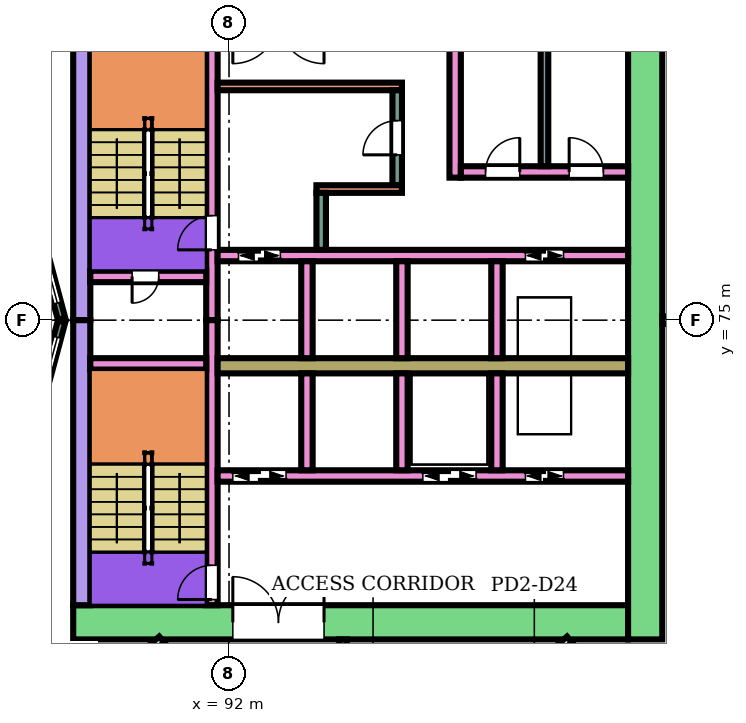
"""IFC4 building model, lengths in metres.
Left out: names, types, materials, properties, quantities, classifications, styles, units other than length and angle.
Written with IfcOpenShell. Run it as: python <this file> out.ifc"""

import sys

from ifc_helpers import new_model, si_unit, direction, frame, frame_2d, origin, place, context, subcontext, project, spatial, rectangle, extrude, element, fill, save


model = new_model("IFC4")
c1 = context("Model", 3, precision=1e-05, world=origin(), true_north=direction((0.0, 1.0)))
c2 = subcontext(c1, "Body", "Model", "MODEL_VIEW")
j1 = project(units=[si_unit("LENGTHUNIT", "METRE"), si_unit("PLANEANGLEUNIT", "RADIAN")], contexts=[c1])
p1 = place(None, origin())
s1 = spatial("IfcSite", under=j1, at=p1, CompositionType="ELEMENT")
p2 = place(p1, origin())
s2 = spatial("IfcBuilding", under=s1, at=p2, CompositionType="ELEMENT")
p3 = place(p2, frame((0.0, 0.0, 12.4)))
s3 = spatial("IfcBuildingStorey", under=s2, at=p3, CompositionType="ELEMENT", Elevation=12.4)
p4 = place(p3, frame((87.9, 67.05, 0.0), z_axis=(0.0, 0.0, 1.0), x_axis=(1.0, 0.0, 0.0)))
e1 = element("IfcWall", 1, at=p4, inside=s3, PredefinedType="SHEAR", context=c2, shape_type="SweptSolid", body=[
    extrude(rectangle(XDim=14.6, YDim=0.9, at=frame_2d((7.3, 0.0))), origin(), (0.0, 0.0, 1.0), 4.95),
])
p5 = place(p4, frame((4.2, 0.0, 0.0)))
e2 = element("IfcOpeningElement", 2, at=p5, cuts=e1, PredefinedType="OPENING", context=c2, shape_type="SweptSolid", body=[
    extrude(rectangle(XDim=2.4, YDim=2.4, at=frame_2d((1.2, 1.2))), frame((0.0, 0.46, 0.0), z_axis=(0.0, -1.0, 0.0), x_axis=(1.0, 0.0, 0.0)), (0.0, 0.0, 1.0), 0.92),
])
for number, where, z_axis, x_axis in (
    (3, (88.125, 75.0, 0.0), (0.0, 0.0, 1.0), (0.0, 1.0, 0.0)),
    (4, (88.125, 67.5, 0.0), (0.0, 0.0, 1.0), (0.0, 1.0, 0.0)),
):
    element("IfcWall", number, at=place(p3, frame(where, z_axis=z_axis, x_axis=x_axis)), inside=s3, PredefinedType="SHEAR", context=c2, shape_type="SweptSolid", body=[
        extrude(rectangle(XDim=7.5, YDim=0.45, at=frame_2d((3.75, 0.0))), origin(), (0.0, 0.0, 1.0), 4.95),
    ])
p6 = place(p3, frame((102.95, 66.6, 0.0), z_axis=(0.0, 0.0, 1.0), x_axis=(0.0, 1.0, 0.0)))
e5 = element("IfcWall", 5, at=p6, inside=s3, PredefinedType="SHEAR", context=c2, shape_type="SweptSolid", body=[
    extrude(rectangle(XDim=16.8, YDim=0.9, at=frame_2d((8.4, 0.0))), origin(), (0.0, 0.0, 1.0), 4.95),
])
p7 = place(p3, frame((91.55, 75.0, 0.0), z_axis=(0.0, 0.0, 1.0), x_axis=(0.0, 1.0, 0.0)))
e6 = element("IfcWall", 6, at=p7, inside=s3, PredefinedType="SHEAR", context=c2, shape_type="SweptSolid", body=[
    extrude(rectangle(XDim=7.5, YDim=0.3, at=frame_2d((3.75, 0.0))), origin(), (0.0, 0.0, 1.0), 4.95),
])
p8 = place(p7, frame((1.85, 0.0, 0.0)))
e7 = element("IfcOpeningElement", 7, at=p8, cuts=e6, PredefinedType="OPENING", context=c2, shape_type="SweptSolid", body=[
    extrude(rectangle(XDim=0.9, YDim=2.1, at=frame_2d((0.45, 1.05))), frame((0.0, 0.16, 0.0), z_axis=(0.0, -1.0, 0.0), x_axis=(1.0, 0.0, 0.0)), (0.0, 0.0, 1.0), 0.32),
])
p9 = place(p3, frame((91.55, 67.5, 0.0), z_axis=(0.0, 0.0, 1.0), x_axis=(0.0, 1.0, 0.0)))
e8 = element("IfcWall", 8, at=p9, inside=s3, PredefinedType="SHEAR", context=c2, shape_type="SweptSolid", body=[
    extrude(rectangle(XDim=7.5, YDim=0.3, at=frame_2d((3.75, 0.0))), origin(), (0.0, 0.0, 1.0), 4.95),
])
p10 = place(p9, frame((0.15, 0.0, 0.0)))
e9 = element("IfcOpeningElement", 9, at=p10, cuts=e8, PredefinedType="OPENING", context=c2, shape_type="SweptSolid", body=[
    extrude(rectangle(XDim=0.9, YDim=2.1, at=frame_2d((0.45, 1.05))), frame((0.0, 0.16, 0.0), z_axis=(0.0, -1.0, 0.0), x_axis=(1.0, 0.0, 0.0)), (0.0, 0.0, 1.0), 0.32),
])
p11 = place(p3, frame((88.35, 76.15, 0.0), z_axis=(0.0, 0.0, 1.0), x_axis=(1.0, 0.0, 0.0)))
e10 = element("IfcWall", 10, at=p11, inside=s3, PredefinedType="SHEAR", context=c2, shape_type="SweptSolid", body=[
    extrude(rectangle(XDim=3.05, YDim=0.3, at=frame_2d((1.525, 0.0))), origin(), (0.0, 0.0, 1.0), 4.95),
])
p12 = place(p11, frame((1.1, 0.0, 0.0)))
e11 = element("IfcOpeningElement", 11, at=p12, cuts=e10, PredefinedType="OPENING", context=c2, shape_type="SweptSolid", body=[
    extrude(rectangle(XDim=0.7, YDim=2.0, at=frame_2d((0.35, 1.0))), frame((0.0, 0.16, 0.0), z_axis=(0.0, -1.0, 0.0), x_axis=(1.0, 0.0, 0.0)), (0.0, 0.0, 1.0), 0.32),
])
p13 = place(p3, frame((88.35, 73.85, 0.0), z_axis=(0.0, 0.0, 1.0), x_axis=(1.0, 0.0, 0.0)))
e12 = element("IfcWall", 12, at=p13, inside=s3, PredefinedType="SHEAR", context=c2, shape_type="SweptSolid", body=[
    extrude(rectangle(XDim=3.05, YDim=0.3, at=frame_2d((1.525, 0.0))), origin(), (0.0, 0.0, 1.0), 4.95),
])
p14 = place(p3, frame((91.7, 76.7, 0.0), z_axis=(0.0, 0.0, 1.0), x_axis=(1.0, 0.0, 0.0)))
e13 = element("IfcWall", 13, at=p14, inside=s3, PredefinedType="SHEAR", context=c2, shape_type="SweptSolid", body=[
    extrude(rectangle(XDim=10.8, YDim=0.3, at=frame_2d((5.4, 0.0))), origin(), (0.0, 0.0, 1.0), 4.95),
])
p15 = place(p14, frame((0.55, 0.0, 0.0)))
e14 = element("IfcOpeningElement", 14, at=p15, cuts=e13, PredefinedType="OPENING", context=c2, shape_type="SweptSolid", body=[
    extrude(rectangle(XDim=1.1, YDim=2.1, at=frame_2d((0.55, 1.05))), frame((0.0, 0.16, 0.0), z_axis=(0.0, -1.0, 0.0), x_axis=(1.0, 0.0, 0.0)), (0.0, 0.0, 1.0), 0.32),
])
p16 = place(p14, frame((8.1, 0.0, 0.0)))
e15 = element("IfcOpeningElement", 15, at=p16, cuts=e13, PredefinedType="OPENING", context=c2, shape_type="SweptSolid", body=[
    extrude(rectangle(XDim=1.0, YDim=2.1, at=frame_2d((0.5, 1.05))), frame((0.0, 0.16, 0.0), z_axis=(0.0, -1.0, 0.0), x_axis=(1.0, 0.0, 0.0)), (0.0, 0.0, 1.0), 0.32),
])
p17 = place(p3, frame((91.7, 73.8, 0.0), z_axis=(0.0, 0.0, 1.0), x_axis=(1.0, 0.0, 0.0)))
e16 = element("IfcWall", 16, at=p17, inside=s3, PredefinedType="SHEAR", context=c2, shape_type="SweptSolid", body=[
    extrude(rectangle(XDim=10.8, YDim=0.4, at=frame_2d((5.4, 0.0))), origin(), (0.0, 0.0, 1.0), 4.95),
])
p18 = place(p3, frame((91.7, 70.9, 0.0), z_axis=(0.0, 0.0, 1.0), x_axis=(1.0, 0.0, 0.0)))
e17 = element("IfcWall", 17, at=p18, inside=s3, PredefinedType="SHEAR", context=c2, shape_type="SweptSolid", body=[
    extrude(rectangle(XDim=10.8, YDim=0.3, at=frame_2d((5.4, 0.0))), origin(), (0.0, 0.0, 1.0), 4.95),
])
p19 = place(p18, frame((0.4, 0.0, 0.0)))
e18 = element("IfcOpeningElement", 18, at=p19, cuts=e17, PredefinedType="OPENING", context=c2, shape_type="SweptSolid", body=[
    extrude(rectangle(XDim=1.4, YDim=2.1, at=frame_2d((0.7, 1.05))), frame((0.0, 0.16, 0.0), z_axis=(0.0, -1.0, 0.0), x_axis=(1.0, 0.0, 0.0)), (0.0, 0.0, 1.0), 0.32),
])
p20 = place(p18, frame((5.4, 0.0, 0.0)))
e19 = element("IfcOpeningElement", 19, at=p20, cuts=e17, PredefinedType="OPENING", context=c2, shape_type="SweptSolid", body=[
    extrude(rectangle(XDim=1.4, YDim=2.1, at=frame_2d((0.7, 1.05))), frame((0.0, 0.16, 0.0), z_axis=(0.0, -1.0, 0.0), x_axis=(1.0, 0.0, 0.0)), (0.0, 0.0, 1.0), 0.32),
])
p21 = place(p18, frame((8.1, 0.0, 0.0)))
e20 = element("IfcOpeningElement", 20, at=p21, cuts=e17, PredefinedType="OPENING", context=c2, shape_type="SweptSolid", body=[
    extrude(rectangle(XDim=1.0, YDim=2.1, at=frame_2d((0.5, 1.05))), frame((0.0, 0.16, 0.0), z_axis=(0.0, -1.0, 0.0), x_axis=(1.0, 0.0, 0.0)), (0.0, 0.0, 1.0), 0.32),
])
for number, where, z_axis, x_axis in (
    (21, (94.05, 74.0, 0.0), (0.0, 0.0, 1.0), (0.0, 1.0, 0.0)),
    (22, (96.55, 74.0, 0.0), (0.0, 0.0, 1.0), (0.0, 1.0, 0.0)),
    (23, (99.05, 74.0, 0.0), (0.0, 0.0, 1.0), (0.0, 1.0, 0.0)),
    (24, (94.05, 71.05, 0.0), (0.0, 0.0, 1.0), (0.0, 1.0, 0.0)),
    (25, (96.55, 71.05, 0.0), (0.0, 0.0, 1.0), (0.0, 1.0, 0.0)),
    (26, (99.05, 71.05, 0.0), (0.0, 0.0, 1.0), (0.0, 1.0, 0.0)),
):
    element("IfcWall", number, at=place(p3, frame(where, z_axis=z_axis, x_axis=x_axis)), inside=s3, PredefinedType="SHEAR", context=c2, shape_type="SweptSolid", body=[
        extrude(rectangle(XDim=2.55, YDim=0.3, at=frame_2d((1.275, 0.0))), origin(), (0.0, 0.0, 1.0), 4.95),
    ])
p22 = place(p3, frame((91.7, 81.15, 0.0), z_axis=(0.0, 0.0, 1.0), x_axis=(1.0, 0.0, 0.0)))
e27 = element("IfcWall", 27, at=p22, inside=s3, PredefinedType="SHEAR", context=c2, shape_type="SweptSolid", body=[
    extrude(rectangle(XDim=4.85, YDim=0.2, at=frame_2d((2.425, 0.0))), origin(), (0.0, 0.0, 1.0), 4.95),
])
p23 = place(p3, frame((96.425, 78.55, 0.0), z_axis=(0.0, 0.0, 1.0), x_axis=(0.0, 1.0, 0.0)))
e28 = element("IfcWall", 28, at=p23, inside=s3, PredefinedType="SHEAR", context=c2, shape_type="SweptSolid", body=[
    extrude(rectangle(XDim=2.5, YDim=0.25, at=frame_2d((1.25, 0.0))), origin(), (0.0, 0.0, 1.0), 4.95),
])
p24 = place(p23, frame((0.8, 0.0, 0.0)))
e29 = element("IfcOpeningElement", 29, at=p24, cuts=e28, PredefinedType="OPENING", context=c2, shape_type="SweptSolid", body=[
    extrude(rectangle(XDim=0.9, YDim=2.1, at=frame_2d((0.45, 1.05))), frame((0.0, 0.135, 0.0), z_axis=(0.0, -1.0, 0.0), x_axis=(1.0, 0.0, 0.0)), (0.0, 0.0, 1.0), 0.27),
])
p25 = place(p3, frame((94.3, 78.45, 0.0), z_axis=(0.0, 0.0, 1.0), x_axis=(1.0, 0.0, 0.0)))
e30 = element("IfcWall", 30, at=p25, inside=s3, PredefinedType="SHEAR", context=c2, shape_type="SweptSolid", body=[
    extrude(rectangle(XDim=2.25, YDim=0.2, at=frame_2d((1.125, 0.0))), origin(), (0.0, 0.0, 1.0), 4.95),
])
p26 = place(p3, frame((94.425, 76.85, 0.0), z_axis=(0.0, 0.0, 1.0), x_axis=(0.0, 1.0, 0.0)))
e31 = element("IfcWall", 31, at=p26, inside=s3, PredefinedType="SHEAR", context=c2, shape_type="SweptSolid", body=[
    extrude(rectangle(XDim=1.5, YDim=0.25, at=frame_2d((0.75, 0.0))), origin(), (0.0, 0.0, 1.0), 4.95),
])
p27 = place(p3, frame((97.95, 78.75, 0.0), z_axis=(0.0, 0.0, 1.0), x_axis=(0.0, 1.0, 0.0)))
e32 = element("IfcWall", 32, at=p27, inside=s3, PredefinedType="SHEAR", context=c2, shape_type="SweptSolid", body=[
    extrude(rectangle(XDim=3.75, YDim=0.3, at=frame_2d((1.875, 0.0))), origin(), (0.0, 0.0, 1.0), 4.95),
])
p28 = place(p3, frame((98.1, 78.9, 0.0), z_axis=(0.0, 0.0, 1.0), x_axis=(1.0, 0.0, 0.0)))
e33 = element("IfcWall", 33, at=p28, inside=s3, PredefinedType="SHEAR", context=c2, shape_type="SweptSolid", body=[
    extrude(rectangle(XDim=4.4, YDim=0.3, at=frame_2d((2.2, 0.0))), origin(), (0.0, 0.0, 1.0), 4.95),
])
p29 = place(p28, frame((0.65, 0.0, 0.0)))
e34 = element("IfcOpeningElement", 34, at=p29, cuts=e33, PredefinedType="OPENING", context=c2, shape_type="SweptSolid", body=[
    extrude(rectangle(XDim=0.9, YDim=2.1, at=frame_2d((0.45, 1.05))), frame((0.0, 0.16, 0.0), z_axis=(0.0, -1.0, 0.0), x_axis=(1.0, 0.0, 0.0)), (0.0, 0.0, 1.0), 0.32),
])
p30 = place(p28, frame((2.85, 0.0, 0.0)))
e35 = element("IfcOpeningElement", 35, at=p30, cuts=e33, PredefinedType="OPENING", context=c2, shape_type="SweptSolid", body=[
    extrude(rectangle(XDim=0.9, YDim=2.1, at=frame_2d((0.45, 1.05))), frame((0.0, 0.16, 0.0), z_axis=(0.0, -1.0, 0.0), x_axis=(1.0, 0.0, 0.0)), (0.0, 0.0, 1.0), 0.32),
])
p31 = place(p3, frame((87.604, 75.0, 0.0), z_axis=(0.0, 0.0, 1.0), x_axis=(-0.258789828301, 0.965933654434, 0.0)))
e36 = element("IfcWall", 36, at=p31, inside=s3, PredefinedType="NOTDEFINED", context=c2, shape_type="SweptSolid", body=[
    extrude(rectangle(XDim=3.936, YDim=0.2, at=frame_2d((1.968, 0.0))), origin(), (0.0, 0.0, 1.0), 5.4),
])
p32 = place(p31, frame((0.468, 0.0, 0.9)))
e37 = element("IfcOpeningElement", 37, at=p32, cuts=e36, PredefinedType="OPENING", context=c2, shape_type="SweptSolid", body=[
    extrude(rectangle(XDim=3.0, YDim=2.3, at=frame_2d((1.5, 1.15))), frame((0.0, 0.11, 0.0), z_axis=(0.0, -1.0, 0.0), x_axis=(1.0, 0.0, 0.0)), (0.0, 0.0, 1.0), 0.22),
])
p33 = place(p3, frame((86.585, 71.198, 0.0), z_axis=(0.0, 0.0, 1.0), x_axis=(0.258789828301, 0.965933654434, 0.0)))
e38 = element("IfcWall", 38, at=p33, inside=s3, PredefinedType="NOTDEFINED", context=c2, shape_type="SweptSolid", body=[
    extrude(rectangle(XDim=3.936, YDim=0.2, at=frame_2d((1.968, 0.0))), origin(), (0.0, 0.0, 1.0), 5.4),
])
p34 = place(p33, frame((0.468, 0.0, 0.9)))
e39 = element("IfcOpeningElement", 39, at=p34, cuts=e38, PredefinedType="OPENING", context=c2, shape_type="SweptSolid", body=[
    extrude(rectangle(XDim=3.0, YDim=2.3, at=frame_2d((1.5, 1.15))), frame((0.0, 0.11, 0.0), z_axis=(0.0, -1.0, 0.0), x_axis=(1.0, 0.0, 0.0)), (0.0, 0.0, 1.0), 0.22),
])
p35 = place(p3, frame((86.685, 63.551, 0.0), z_axis=(0.0, 0.0, 1.0), x_axis=(0.758049900748, 0.652196556244, 0.0)))
e40 = element("IfcWall", 40, at=p35, inside=s3, PredefinedType="PARTITIONING", context=c2, shape_type="SweptSolid", body=[
    extrude(rectangle(XDim=4.675, YDim=0.2, at=frame_2d((2.337, 0.0))), origin(), (0.0, 0.0, 1.0), 4.95),
])
p36 = place(p35, frame((1.887, 0.0, 0.0)))
e41 = element("IfcOpeningElement", 41, at=p36, cuts=e40, PredefinedType="OPENING", context=c2, shape_type="SweptSolid", body=[
    extrude(rectangle(XDim=0.9, YDim=2.1, at=frame_2d((0.45, 1.05))), frame((0.0, 0.11, 0.0), z_axis=(0.0, -1.0, 0.0), x_axis=(1.0, 0.0, 0.0)), (0.0, 0.0, 1.0), 0.22),
])
p37 = place(p3, frame((94.293, 60.863, 0.0), z_axis=(0.0, 0.0, 1.0), x_axis=(0.757971612666, 0.652287539658, 0.0)))
e42 = element("IfcWall", 42, at=p37, inside=s3, PredefinedType="PARTITIONING", context=c2, shape_type="SweptSolid", body=[
    extrude(rectangle(XDim=8.794, YDim=0.2, at=frame_2d((4.397, 0.0))), origin(), (0.0, 0.0, 1.0), 4.95),
])
p38 = place(p37, frame((0.267, 0.0, 0.0)))
e43 = element("IfcOpeningElement", 43, at=p38, cuts=e42, PredefinedType="OPENING", context=c2, shape_type="SweptSolid", body=[
    extrude(rectangle(XDim=0.9, YDim=2.1, at=frame_2d((0.45, 1.05))), frame((0.0, 0.11, 0.0), z_axis=(0.0, -1.0, 0.0), x_axis=(1.0, 0.0, 0.0)), (0.0, 0.0, 1.0), 0.22),
])
p39 = place(p37, frame((2.446, 0.0, 0.0)))
e44 = element("IfcOpeningElement", 44, at=p39, cuts=e42, PredefinedType="OPENING", context=c2, shape_type="SweptSolid", body=[
    extrude(rectangle(XDim=0.9, YDim=2.1, at=frame_2d((0.45, 1.05))), frame((0.0, 0.11, 0.0), z_axis=(0.0, -1.0, 0.0), x_axis=(1.0, 0.0, 0.0)), (0.0, 0.0, 1.0), 0.22),
])
p40 = place(p37, frame((4.87, 0.0, 0.0)))
e45 = element("IfcOpeningElement", 45, at=p40, cuts=e42, PredefinedType="OPENING", context=c2, shape_type="SweptSolid", body=[
    extrude(rectangle(XDim=0.9, YDim=2.1, at=frame_2d((0.45, 1.05))), frame((0.0, 0.11, 0.0), z_axis=(0.0, -1.0, 0.0), x_axis=(1.0, 0.0, 0.0)), (0.0, 0.0, 1.0), 0.22),
])
p41 = place(p37, frame((7.123, 0.0, 0.0)))
e46 = element("IfcOpeningElement", 46, at=p41, cuts=e42, PredefinedType="OPENING", context=c2, shape_type="SweptSolid", body=[
    extrude(rectangle(XDim=0.9, YDim=2.1, at=frame_2d((0.45, 1.05))), frame((0.0, 0.11, 0.0), z_axis=(0.0, -1.0, 0.0), x_axis=(1.0, 0.0, 0.0)), (0.0, 0.0, 1.0), 0.22),
])
p42 = place(p3, frame((95.0, 65.1, 0.0), z_axis=(0.0, 0.0, 1.0), x_axis=(0.0, 1.0, 0.0)))
e47 = element("IfcWall", 47, at=p42, inside=s3, PredefinedType="PARTITIONING", context=c2, shape_type="SweptSolid", body=[
    extrude(rectangle(XDim=1.499, YDim=0.2, at=frame_2d((0.75, 0.0))), origin(), (0.0, 0.0, 1.0), 4.95),
])
p43 = place(p3, frame((103.402, 75.0, 0.0), z_axis=(0.0, 0.0, 1.0), x_axis=(1.0, 0.0, 0.0)))
e48 = element("IfcWall", 48, at=p43, inside=s3, PredefinedType="PARTITIONING", context=c2, shape_type="SweptSolid", body=[
    extrude(rectangle(XDim=12.394, YDim=0.2, at=frame_2d((6.197, 0.0))), origin(), (0.0, 0.0, 1.0), 3.75),
])
p44 = place(p3, frame((100.3, 79.05, 0.0), z_axis=(0.0, 0.0, 1.0), x_axis=(0.0, 1.0, 0.0)))
e49 = element("IfcWall", 49, at=p44, inside=s3, PredefinedType="PARTITIONING", context=c2, shape_type="SweptSolid", body=[
    extrude(rectangle(XDim=3.45, YDim=0.2, at=frame_2d((1.725, 0.0))), origin(), (0.0, 0.0, 1.0), 4.95),
])
p45 = place(p32, origin())
e50 = element("IfcWindow", 50, at=p45, inside=s3, PartitioningType="SINGLE_PANEL", PredefinedType="WINDOW", context=c2, shape_type="SweptSolid", body=[
    extrude(rectangle(XDim=3.0, YDim=2.3, at=frame_2d((1.5, 1.15))), frame((0.0, 0.03, 0.0), z_axis=(0.0, -1.0, 0.0), x_axis=(1.0, 0.0, 0.0)), (0.0, 0.0, 1.0), 0.06),
])
fill(e37, e50)
p46 = place(p34, origin())
e51 = element("IfcWindow", 51, at=p46, inside=s3, PartitioningType="SINGLE_PANEL", PredefinedType="WINDOW", context=c2, shape_type="SweptSolid", body=[
    extrude(rectangle(XDim=3.0, YDim=2.3, at=frame_2d((1.5, 1.15))), frame((0.0, 0.03, 0.0), z_axis=(0.0, -1.0, 0.0), x_axis=(1.0, 0.0, 0.0)), (0.0, 0.0, 1.0), 0.06),
])
fill(e39, e51)
p47 = place(p12, frame((0.7, 0.0, 0.0), z_axis=(0.0, 0.0, 1.0), x_axis=(-1.0, 0.0, 0.0)))
e52 = element("IfcDoor", 52, at=p47, inside=s3, OperationType="SINGLE_SWING_RIGHT", PredefinedType="DOOR", context=c2, shape_type="SweptSolid", body=[
    extrude(rectangle(XDim=0.7, YDim=2.0, at=frame_2d((0.35, 1.0))), frame((0.0, 0.025, 0.0), z_axis=(0.0, -1.0, 0.0), x_axis=(1.0, 0.0, 0.0)), (0.0, 0.0, 1.0), 0.05),
])
fill(e11, e52)
p48 = place(p8, origin())
e53 = element("IfcDoor", 53, at=p48, inside=s3, OperationType="SINGLE_SWING_LEFT", PredefinedType="DOOR", context=c2, shape_type="SweptSolid", body=[
    extrude(rectangle(XDim=0.9, YDim=2.1, at=frame_2d((0.45, 1.05))), frame((0.0, 0.025, 0.0), z_axis=(0.0, -1.0, 0.0), x_axis=(1.0, 0.0, 0.0)), (0.0, 0.0, 1.0), 0.05),
])
fill(e7, e53)
p49 = place(p10, origin())
e54 = element("IfcDoor", 54, at=p49, inside=s3, OperationType="SINGLE_SWING_LEFT", PredefinedType="DOOR", context=c2, shape_type="SweptSolid", body=[
    extrude(rectangle(XDim=0.9, YDim=2.1, at=frame_2d((0.45, 1.05))), frame((0.0, 0.025, 0.0), z_axis=(0.0, -1.0, 0.0), x_axis=(1.0, 0.0, 0.0)), (0.0, 0.0, 1.0), 0.05),
])
fill(e9, e54)
p50 = place(p15, origin())
e55 = element("IfcDoor", 55, at=p50, inside=s3, OperationType="DOUBLE_DOOR_SLIDING", PredefinedType="DOOR", context=c2, shape_type="SweptSolid", body=[
    extrude(rectangle(XDim=1.1, YDim=2.1, at=frame_2d((0.55, 1.05))), frame((0.0, 0.025, 0.0), z_axis=(0.0, -1.0, 0.0), x_axis=(1.0, 0.0, 0.0)), (0.0, 0.0, 1.0), 0.05),
])
fill(e14, e55)
p51 = place(p16, origin())
e56 = element("IfcDoor", 56, at=p51, inside=s3, OperationType="DOUBLE_DOOR_SLIDING", PredefinedType="DOOR", context=c2, shape_type="SweptSolid", body=[
    extrude(rectangle(XDim=1.0, YDim=2.1, at=frame_2d((0.5, 1.05))), frame((0.0, 0.025, 0.0), z_axis=(0.0, -1.0, 0.0), x_axis=(1.0, 0.0, 0.0)), (0.0, 0.0, 1.0), 0.05),
])
fill(e15, e56)
p52 = place(p19, origin())
e57 = element("IfcDoor", 57, at=p52, inside=s3, OperationType="DOUBLE_DOOR_SLIDING", PredefinedType="DOOR", context=c2, shape_type="SweptSolid", body=[
    extrude(rectangle(XDim=1.4, YDim=2.1, at=frame_2d((0.7, 1.05))), frame((0.0, 0.025, 0.0), z_axis=(0.0, -1.0, 0.0), x_axis=(1.0, 0.0, 0.0)), (0.0, 0.0, 1.0), 0.05),
])
fill(e18, e57)
p53 = place(p20, origin())
e58 = element("IfcDoor", 58, at=p53, inside=s3, OperationType="DOUBLE_DOOR_SLIDING", PredefinedType="DOOR", context=c2, shape_type="SweptSolid", body=[
    extrude(rectangle(XDim=1.4, YDim=2.1, at=frame_2d((0.7, 1.05))), frame((0.0, 0.025, 0.0), z_axis=(0.0, -1.0, 0.0), x_axis=(1.0, 0.0, 0.0)), (0.0, 0.0, 1.0), 0.05),
])
fill(e19, e58)
p54 = place(p21, origin())
e59 = element("IfcDoor", 59, at=p54, inside=s3, OperationType="DOUBLE_DOOR_SLIDING", PredefinedType="DOOR", context=c2, shape_type="SweptSolid", body=[
    extrude(rectangle(XDim=1.0, YDim=2.1, at=frame_2d((0.5, 1.05))), frame((0.0, 0.025, 0.0), z_axis=(0.0, -1.0, 0.0), x_axis=(1.0, 0.0, 0.0)), (0.0, 0.0, 1.0), 0.05),
])
fill(e20, e59)
p55 = place(p24, origin())
e60 = element("IfcDoor", 60, at=p55, inside=s3, OperationType="SINGLE_SWING_LEFT", PredefinedType="DOOR", context=c2, shape_type="SweptSolid", body=[
    extrude(rectangle(XDim=0.9, YDim=2.1, at=frame_2d((0.45, 1.05))), frame((0.0, 0.025, 0.0), z_axis=(0.0, -1.0, 0.0), x_axis=(1.0, 0.0, 0.0)), (0.0, 0.0, 1.0), 0.05),
])
fill(e29, e60)
p56 = place(p29, origin())
e61 = element("IfcDoor", 61, at=p56, inside=s3, OperationType="SINGLE_SWING_RIGHT", PredefinedType="DOOR", context=c2, shape_type="SweptSolid", body=[
    extrude(rectangle(XDim=0.9, YDim=2.1, at=frame_2d((0.45, 1.05))), frame((0.0, 0.025, 0.0), z_axis=(0.0, -1.0, 0.0), x_axis=(1.0, 0.0, 0.0)), (0.0, 0.0, 1.0), 0.05),
])
fill(e34, e61)
p57 = place(p30, origin())
e62 = element("IfcDoor", 62, at=p57, inside=s3, OperationType="SINGLE_SWING_LEFT", PredefinedType="DOOR", context=c2, shape_type="SweptSolid", body=[
    extrude(rectangle(XDim=0.9, YDim=2.1, at=frame_2d((0.45, 1.05))), frame((0.0, 0.025, 0.0), z_axis=(0.0, -1.0, 0.0), x_axis=(1.0, 0.0, 0.0)), (0.0, 0.0, 1.0), 0.05),
])
fill(e35, e62)
p58 = place(p5, origin())
e63 = element("IfcDoor", 63, at=p58, inside=s3, OperationType="DOUBLE_DOOR_SINGLE_SWING", PredefinedType="DOOR", context=c2, shape_type="SweptSolid", body=[
    extrude(rectangle(XDim=2.4, YDim=2.4, at=frame_2d((1.2, 1.2))), frame((0.0, 0.025, 0.0), z_axis=(0.0, -1.0, 0.0), x_axis=(1.0, 0.0, 0.0)), (0.0, 0.0, 1.0), 0.05),
])
fill(e2, e63)
save(model, sys.argv[1])
